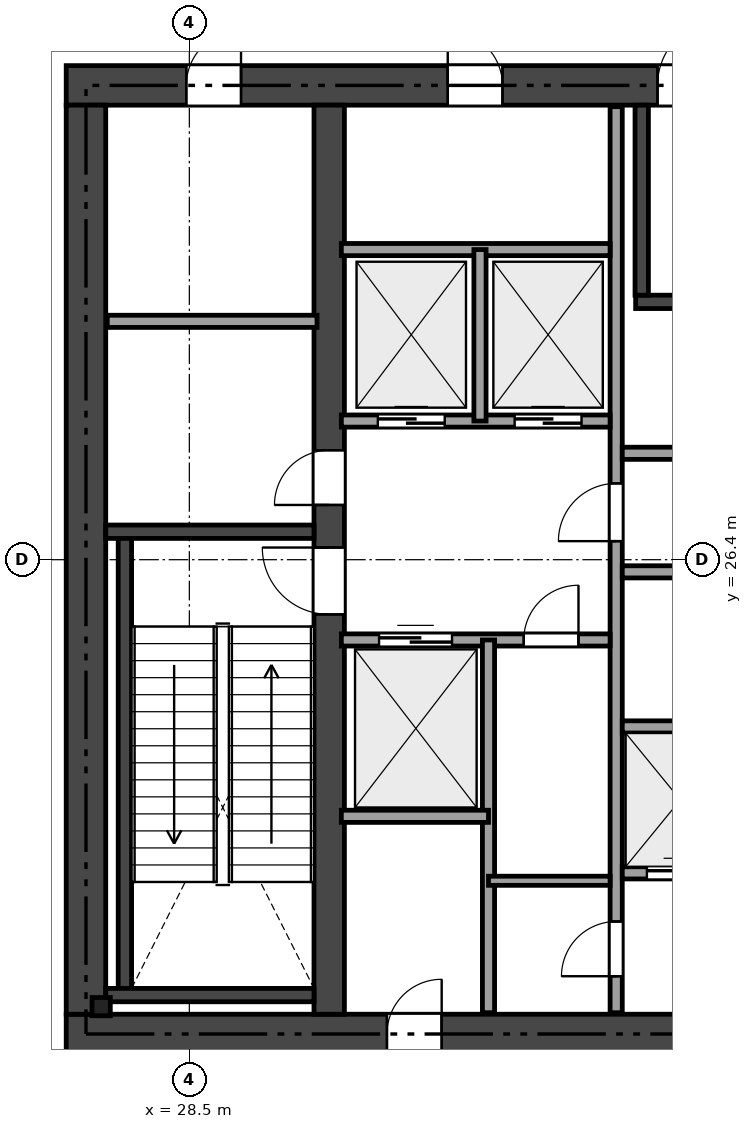
"""IFC4 building model, lengths in metres.
Left out: names, types, materials, properties, quantities, classifications, styles, units other than length and angle.
Written with IfcOpenShell. Run it as: python <this file> out.ifc"""

import sys

from ifc_helpers import new_model, si_unit, direction, frame, frame_2d, origin, origin_2d, place, context, subcontext, project, spatial, rectangle, i_section, extrude, element, fill, save


model = new_model("IFC4")
c1 = context("Model", 3, precision=1e-05, world=origin(), true_north=direction((0.0, 1.0)))
c2 = subcontext(c1, "Body", "Model", "MODEL_VIEW")
j1 = project(units=[si_unit("LENGTHUNIT", "METRE"), si_unit("PLANEANGLEUNIT", "RADIAN")], contexts=[c1])
p1 = place(None, origin())
s1 = spatial("IfcSite", under=j1, at=p1, CompositionType="ELEMENT")
p2 = place(p1, origin())
s2 = spatial("IfcBuilding", under=s1, at=p2, CompositionType="ELEMENT")
p3 = place(p2, frame((0.0, 0.0, 10.8)))
s3 = spatial("IfcBuildingStorey", under=s2, at=p3, CompositionType="ELEMENT", Elevation=10.8)
p4 = place(p3, frame((26.475, 18.6, 0.0), z_axis=(0.0, 0.0, 1.0), x_axis=(1.0, 0.0, 0.0)))
e1 = element("IfcWall", 1, at=p4, inside=s3, PredefinedType="SHEAR", context=c2, shape_type="SweptSolid", body=[
    extrude(rectangle(XDim=21.45, YDim=0.65, at=frame_2d((10.725, 0.0))), origin(), (0.0, 0.0, 1.0), 5.05),
])
p5 = place(p4, frame((12.45, 0.0, 0.0)))
e2 = element("IfcOpeningElement", 2, at=p5, cuts=e1, PredefinedType="OPENING", context=c2, shape_type="SweptSolid", body=[
    extrude(rectangle(XDim=1.15, YDim=2.15, at=frame_2d((0.575, 1.075))), frame((0.0, 0.335, 0.0), z_axis=(0.0, -1.0, 0.0), x_axis=(1.0, 0.0, 0.0)), (0.0, 0.0, 1.0), 0.67),
])
p6 = place(p4, frame((5.275, 0.0, 0.0)))
e3 = element("IfcOpeningElement", 3, at=p6, cuts=e1, PredefinedType="OPENING", context=c2, shape_type="SweptSolid", body=[
    extrude(rectangle(XDim=0.9, YDim=2.1, at=frame_2d((0.45, 1.05))), frame((0.0, 0.335, 0.0), z_axis=(0.0, -1.0, 0.0), x_axis=(1.0, 0.0, 0.0)), (0.0, 0.0, 1.0), 0.67),
])
p7 = place(p3, frame((26.475, 34.2, 0.0), z_axis=(0.0, 0.0, 1.0), x_axis=(1.0, 0.0, 0.0)))
e4 = element("IfcWall", 4, at=p7, inside=s3, PredefinedType="SHEAR", context=c2, shape_type="SweptSolid", body=[
    extrude(rectangle(XDim=21.45, YDim=0.65, at=frame_2d((10.725, 0.0))), origin(), (0.0, 0.0, 1.0), 5.05),
])
p8 = place(p7, frame((9.725, 0.0, 0.0)))
e5 = element("IfcOpeningElement", 5, at=p8, cuts=e4, PredefinedType="OPENING", context=c2, shape_type="SweptSolid", body=[
    extrude(rectangle(XDim=1.1, YDim=2.15, at=frame_2d((0.55, 1.075))), frame((0.0, 0.335, 0.0), z_axis=(0.0, -1.0, 0.0), x_axis=(1.0, 0.0, 0.0)), (0.0, 0.0, 1.0), 0.67),
])
p9 = place(p7, frame((1.975, 0.0, 0.0)))
e6 = element("IfcOpeningElement", 6, at=p9, cuts=e4, PredefinedType="OPENING", context=c2, shape_type="SweptSolid", body=[
    extrude(rectangle(XDim=0.9, YDim=2.1, at=frame_2d((0.45, 1.05))), frame((0.0, 0.335, 0.0), z_axis=(0.0, -1.0, 0.0), x_axis=(1.0, 0.0, 0.0)), (0.0, 0.0, 1.0), 0.67),
])
p10 = place(p7, frame((6.275, 0.0, 0.0)))
e7 = element("IfcOpeningElement", 7, at=p10, cuts=e4, PredefinedType="OPENING", context=c2, shape_type="SweptSolid", body=[
    extrude(rectangle(XDim=0.9, YDim=2.1, at=frame_2d((0.45, 1.05))), frame((0.0, 0.335, 0.0), z_axis=(0.0, -1.0, 0.0), x_axis=(1.0, 0.0, 0.0)), (0.0, 0.0, 1.0), 0.67),
])
p11 = place(p3, frame((26.8, 18.925, 0.0), z_axis=(0.0, 0.0, 1.0), x_axis=(0.0, 1.0, 0.0)))
e8 = element("IfcWall", 8, at=p11, inside=s3, PredefinedType="SHEAR", context=c2, shape_type="SweptSolid", body=[
    extrude(rectangle(XDim=14.95, YDim=0.65, at=frame_2d((7.475, 0.0))), origin(), (0.0, 0.0, 1.0), 5.05),
])
p12 = place(p3, frame((30.8, 18.925, 0.0), z_axis=(0.0, 0.0, 1.0), x_axis=(0.0, 1.0, 0.0)))
e9 = element("IfcWall", 9, at=p12, inside=s3, PredefinedType="SHEAR", context=c2, shape_type="SweptSolid", body=[
    extrude(rectangle(XDim=14.95, YDim=0.5, at=frame_2d((7.475, 0.0))), origin(), (0.0, 0.0, 1.0), 5.05),
])
p13 = place(p12, frame((6.575, 0.0, 0.0)))
e10 = element("IfcOpeningElement", 10, at=p13, cuts=e9, PredefinedType="OPENING", context=c2, shape_type="SweptSolid", body=[
    extrude(rectangle(XDim=1.1, YDim=2.15, at=frame_2d((0.55, 1.075))), frame((0.0, 0.26, 0.0), z_axis=(0.0, -1.0, 0.0), x_axis=(1.0, 0.0, 0.0)), (0.0, 0.0, 1.0), 0.52),
])
p14 = place(p12, frame((8.375, 0.0, 0.0)))
e11 = element("IfcOpeningElement", 11, at=p14, cuts=e9, PredefinedType="OPENING", context=c2, shape_type="SweptSolid", body=[
    extrude(rectangle(XDim=0.9, YDim=2.1, at=frame_2d((0.45, 1.05))), frame((0.0, 0.26, 0.0), z_axis=(0.0, -1.0, 0.0), x_axis=(1.0, 0.0, 0.0)), (0.0, 0.0, 1.0), 0.52),
])
p15 = place(p3, frame((27.125, 26.86, 0.0), z_axis=(0.0, 0.0, 1.0), x_axis=(1.0, 0.0, 0.0)))
e12 = element("IfcWall", 12, at=p15, inside=s3, PredefinedType="SHEAR", context=c2, shape_type="SweptSolid", body=[
    extrude(rectangle(XDim=3.425, YDim=0.22, at=frame_2d((1.712, 0.0))), origin(), (0.0, 0.0, 1.0), 5.05),
])
p16 = place(p3, frame((27.44, 19.35, 0.0), z_axis=(0.0, 0.0, 1.0), x_axis=(0.0, 1.0, 0.0)))
e13 = element("IfcWall", 13, at=p16, inside=s3, PredefinedType="SHEAR", context=c2, shape_type="SweptSolid", body=[
    extrude(rectangle(XDim=7.4, YDim=0.22, at=frame_2d((3.7, 0.0))), origin(), (0.0, 0.0, 1.0), 5.05),
])
p17 = place(p3, frame((27.125, 19.24, 0.0), z_axis=(0.0, 0.0, 1.0), x_axis=(1.0, 0.0, 0.0)))
e14 = element("IfcWall", 14, at=p17, inside=s3, PredefinedType="SHEAR", context=c2, shape_type="SweptSolid", body=[
    extrude(rectangle(XDim=3.425, YDim=0.22, at=frame_2d((1.712, 0.0))), origin(), (0.0, 0.0, 1.0), 5.05),
])
p18 = place(p3, frame((35.84, 30.64, 0.0), z_axis=(0.0, 0.0, 1.0), x_axis=(1.0, 0.0, 0.0)))
e15 = element("IfcWall", 15, at=p18, inside=s3, PredefinedType="SHEAR", context=c2, shape_type="SweptSolid", body=[
    extrude(rectangle(XDim=7.61, YDim=0.22, at=frame_2d((3.805, 0.0))), origin(), (0.0, 0.0, 1.0), 5.05),
])
p19 = place(p3, frame((35.94, 30.75, 0.0), z_axis=(0.0, 0.0, 1.0), x_axis=(0.0, 1.0, 0.0)))
e16 = element("IfcWall", 16, at=p19, inside=s3, PredefinedType="SHEAR", context=c2, shape_type="SweptSolid", body=[
    extrude(rectangle(XDim=3.125, YDim=0.22, at=frame_2d((1.562, 0.0))), origin(), (0.0, 0.0, 1.0), 5.05),
])
p20 = place(p3, frame((27.05, 19.05, 0.0), z_axis=(0.0, 0.0, 1.0), x_axis=(1.0, 0.0, 0.0)))
e17 = element("IfcColumn", 17, at=p20, inside=s3, PredefinedType="PILASTER", context=c2, shape_type="SweptSolid", body=[
    extrude(i_section(OverallWidth=0.3, OverallDepth=0.3, WebThickness=0.011, FlangeThickness=0.019, at=origin_2d()), origin(), (0.0, 0.0, 1.0), 5.05),
])
p21 = place(p3, frame((27.15, 30.32, 0.0), z_axis=(0.0, 0.0, 1.0), x_axis=(1.0, 0.0, 0.0)))
e18 = element("IfcWall", 18, at=p21, inside=s3, PredefinedType="SOLIDWALL", context=c2, shape_type="SweptSolid", body=[
    extrude(rectangle(XDim=3.45, YDim=0.2, at=frame_2d((1.725, 0.0))), origin(), (0.0, 0.0, 1.0), 5.05),
])
p22 = place(p3, frame((35.52, 18.95, 0.0), z_axis=(0.0, 0.0, 1.0), x_axis=(0.0, 1.0, 0.0)))
e19 = element("IfcWall", 19, at=p22, inside=s3, PredefinedType="SOLIDWALL", context=c2, shape_type="SweptSolid", body=[
    extrude(rectangle(XDim=14.9, YDim=0.2, at=frame_2d((7.45, 0.0))), origin(), (0.0, 0.0, 1.0), 4.571),
])
p23 = place(p22, frame((7.755, 0.0, 0.0)))
e20 = element("IfcOpeningElement", 20, at=p23, cuts=e19, PredefinedType="OPENING", context=c2, shape_type="SweptSolid", body=[
    extrude(rectangle(XDim=0.95, YDim=2.15, at=frame_2d((0.475, 1.075))), frame((0.0, 0.11, 0.0), z_axis=(0.0, -1.0, 0.0), x_axis=(1.0, 0.0, 0.0)), (0.0, 0.0, 1.0), 0.22),
])
p24 = place(p22, frame((0.6, 0.0, 0.0)))
e21 = element("IfcOpeningElement", 21, at=p24, cuts=e19, PredefinedType="OPENING", context=c2, shape_type="SweptSolid", body=[
    extrude(rectangle(XDim=0.9, YDim=2.1, at=frame_2d((0.45, 1.05))), frame((0.0, 0.11, 0.0), z_axis=(0.0, -1.0, 0.0), x_axis=(1.0, 0.0, 0.0)), (0.0, 0.0, 1.0), 0.22),
])
p25 = place(p3, frame((31.0, 28.68, 0.0), z_axis=(0.0, 0.0, 1.0), x_axis=(1.0, 0.0, 0.0)))
e22 = element("IfcWall", 22, at=p25, inside=s3, PredefinedType="SOLIDWALL", context=c2, shape_type="SweptSolid", body=[
    extrude(rectangle(XDim=4.42, YDim=0.2, at=frame_2d((2.21, 0.0))), origin(), (0.0, 0.0, 1.0), 5.05),
])
p26 = place(p25, frame((0.6, 0.0, 0.0)))
e23 = element("IfcOpeningElement", 23, at=p26, cuts=e22, PredefinedType="OPENING", context=c2, shape_type="SweptSolid", body=[
    extrude(rectangle(XDim=1.1, YDim=2.15, at=frame_2d((0.55, 1.075))), frame((0.0, 0.11, 0.0), z_axis=(0.0, -1.0, 0.0), x_axis=(1.0, 0.0, 0.0)), (0.0, 0.0, 1.0), 0.22),
])
p27 = place(p25, frame((2.85, 0.0, 0.0)))
e24 = element("IfcOpeningElement", 24, at=p27, cuts=e22, PredefinedType="OPENING", context=c2, shape_type="SweptSolid", body=[
    extrude(rectangle(XDim=1.1, YDim=2.15, at=frame_2d((0.55, 1.075))), frame((0.0, 0.11, 0.0), z_axis=(0.0, -1.0, 0.0), x_axis=(1.0, 0.0, 0.0)), (0.0, 0.0, 1.0), 0.22),
])
p28 = place(p3, frame((31.0, 31.5, 0.0), z_axis=(0.0, 0.0, 1.0), x_axis=(1.0, 0.0, 0.0)))
e25 = element("IfcWall", 25, at=p28, inside=s3, PredefinedType="SOLIDWALL", context=c2, shape_type="SweptSolid", body=[
    extrude(rectangle(XDim=4.42, YDim=0.2, at=frame_2d((2.21, 0.0))), origin(), (0.0, 0.0, 1.0), 5.05),
])
p29 = place(p3, frame((33.28, 28.68, 0.0), z_axis=(0.0, 0.0, 1.0), x_axis=(0.0, 1.0, 0.0)))
e26 = element("IfcWall", 26, at=p29, inside=s3, PredefinedType="SOLIDWALL", context=c2, shape_type="SweptSolid", body=[
    extrude(rectangle(XDim=2.82, YDim=0.2, at=frame_2d((1.41, 0.0))), origin(), (0.0, 0.0, 1.0), 5.05),
])
p30 = place(p3, frame((31.0, 25.08, 0.0), z_axis=(0.0, 0.0, 1.0), x_axis=(1.0, 0.0, 0.0)))
e27 = element("IfcWall", 27, at=p30, inside=s3, PredefinedType="SOLIDWALL", context=c2, shape_type="SweptSolid", body=[
    extrude(rectangle(XDim=4.42, YDim=0.2, at=frame_2d((2.21, 0.0))), origin(), (0.0, 0.0, 1.0), 5.05),
])
p31 = place(p30, frame((3.0, 0.0, 0.0)))
e28 = element("IfcOpeningElement", 28, at=p31, cuts=e27, PredefinedType="OPENING", context=c2, shape_type="SweptSolid", body=[
    extrude(rectangle(XDim=0.9, YDim=2.1, at=frame_2d((0.45, 1.05))), frame((0.0, 0.11, 0.0), z_axis=(0.0, -1.0, 0.0), x_axis=(1.0, 0.0, 0.0)), (0.0, 0.0, 1.0), 0.22),
])
p32 = place(p30, frame((0.62, 0.0, 0.0)))
e29 = element("IfcOpeningElement", 29, at=p32, cuts=e27, PredefinedType="OPENING", context=c2, shape_type="SweptSolid", body=[
    extrude(rectangle(XDim=1.2, YDim=2.15, at=frame_2d((0.6, 1.075))), frame((0.0, 0.11, 0.0), z_axis=(0.0, -1.0, 0.0), x_axis=(1.0, 0.0, 0.0)), (0.0, 0.0, 1.0), 0.22),
])
p33 = place(p3, frame((33.42, 18.95, 0.0), z_axis=(0.0, 0.0, 1.0), x_axis=(0.0, 1.0, 0.0)))
e30 = element("IfcWall", 30, at=p33, inside=s3, PredefinedType="SOLIDWALL", context=c2, shape_type="SweptSolid", body=[
    extrude(rectangle(XDim=6.13, YDim=0.2, at=frame_2d((3.065, 0.0))), origin(), (0.0, 0.0, 1.0), 4.571),
])
p34 = place(p3, frame((31.0, 22.18, 0.0), z_axis=(0.0, 0.0, 1.0), x_axis=(1.0, 0.0, 0.0)))
e31 = element("IfcWall", 31, at=p34, inside=s3, PredefinedType="SOLIDWALL", context=c2, shape_type="SweptSolid", body=[
    extrude(rectangle(XDim=2.42, YDim=0.2, at=frame_2d((1.21, 0.0))), origin(), (0.0, 0.0, 1.0), 5.05),
])
p35 = place(p3, frame((33.42, 21.12, 0.0), z_axis=(0.0, 0.0, 1.0), x_axis=(1.0, 0.0, 0.0)))
e32 = element("IfcWall", 32, at=p35, inside=s3, PredefinedType="PARTITIONING", context=c2, shape_type="SweptSolid", body=[
    extrude(rectangle(XDim=2.0, YDim=0.15, at=frame_2d((1.0, 0.0))), origin(), (0.0, 0.0, 1.0), 5.05),
])
for number, where, z_axis, x_axis in (
    (33, (35.62, 28.15, 0.0), (0.0, 0.0, 1.0), (1.0, 0.0, 0.0)),
    (34, (35.62, 26.2, 0.0), (0.0, 0.0, 1.0), (1.0, 0.0, 0.0)),
):
    element("IfcWall", number, at=place(p3, frame(where, z_axis=z_axis, x_axis=x_axis)), inside=s3, PredefinedType="SOLIDWALL", context=c2, shape_type="SweptSolid", body=[
        extrude(rectangle(XDim=7.88, YDim=0.2, at=frame_2d((3.94, 0.0))), origin(), (0.0, 0.0, 1.0), 5.05),
    ])
p36 = place(p3, frame((35.62, 23.65, 0.0), z_axis=(0.0, 0.0, 1.0), x_axis=(1.0, 0.0, 0.0)))
e35 = element("IfcWall", 35, at=p36, inside=s3, PredefinedType="SOLIDWALL", context=c2, shape_type="SweptSolid", body=[
    extrude(rectangle(XDim=7.88, YDim=0.2, at=frame_2d((3.94, 0.0))), origin(), (0.0, 0.0, 1.0), 4.571),
])
p37 = place(p3, frame((35.62, 21.25, 0.0), z_axis=(0.0, 0.0, 1.0), x_axis=(1.0, 0.0, 0.0)))
e36 = element("IfcWall", 36, at=p37, inside=s3, PredefinedType="SOLIDWALL", context=c2, shape_type="SweptSolid", body=[
    extrude(rectangle(XDim=7.88, YDim=0.2, at=frame_2d((3.94, 0.0))), origin(), (0.0, 0.0, 1.0), 5.05),
])
p38 = place(p37, frame((0.405, 0.0, 0.0)))
e37 = element("IfcOpeningElement", 37, at=p38, cuts=e36, PredefinedType="OPENING", context=c2, shape_type="SweptSolid", body=[
    extrude(rectangle(XDim=1.1, YDim=2.15, at=frame_2d((0.55, 1.075))), frame((0.0, 0.11, 0.0), z_axis=(0.0, -1.0, 0.0), x_axis=(1.0, 0.0, 0.0)), (0.0, 0.0, 1.0), 0.22),
])
p39 = place(p37, frame((2.355, 0.0, 0.0)))
e38 = element("IfcOpeningElement", 38, at=p39, cuts=e36, PredefinedType="OPENING", context=c2, shape_type="SweptSolid", body=[
    extrude(rectangle(XDim=1.1, YDim=2.15, at=frame_2d((0.55, 1.075))), frame((0.0, 0.11, 0.0), z_axis=(0.0, -1.0, 0.0), x_axis=(1.0, 0.0, 0.0)), (0.0, 0.0, 1.0), 0.22),
])
p40 = place(p37, frame((4.305, 0.0, 0.0)))
e39 = element("IfcOpeningElement", 39, at=p40, cuts=e36, PredefinedType="OPENING", context=c2, shape_type="SweptSolid", body=[
    extrude(rectangle(XDim=1.1, YDim=2.15, at=frame_2d((0.55, 1.075))), frame((0.0, 0.11, 0.0), z_axis=(0.0, -1.0, 0.0), x_axis=(1.0, 0.0, 0.0)), (0.0, 0.0, 1.0), 0.22),
])
p41 = place(p37, frame((6.255, 0.0, 0.0)))
e40 = element("IfcOpeningElement", 40, at=p41, cuts=e36, PredefinedType="OPENING", context=c2, shape_type="SweptSolid", body=[
    extrude(rectangle(XDim=1.1, YDim=2.15, at=frame_2d((0.55, 1.075))), frame((0.0, 0.11, 0.0), z_axis=(0.0, -1.0, 0.0), x_axis=(1.0, 0.0, 0.0)), (0.0, 0.0, 1.0), 0.22),
])
p42 = place(p13, origin())
e41 = element("IfcDoor", 41, at=p42, inside=s3, OperationType="SINGLE_SWING_RIGHT", PredefinedType="DOOR", context=c2, shape_type="SweptSolid", body=[
    extrude(rectangle(XDim=1.1, YDim=2.15, at=frame_2d((0.55, 1.075))), frame((0.0, 0.025, 0.0), z_axis=(0.0, -1.0, 0.0), x_axis=(1.0, 0.0, 0.0)), (0.0, 0.0, 1.0), 0.05),
])
fill(e10, e41)
p43 = place(p8, origin())
e42 = element("IfcDoor", 42, at=p43, inside=s3, OperationType="SINGLE_SWING_RIGHT", PredefinedType="DOOR", context=c2, shape_type="SweptSolid", body=[
    extrude(rectangle(XDim=1.1, YDim=2.15, at=frame_2d((0.55, 1.075))), frame((0.0, 0.025, 0.0), z_axis=(0.0, -1.0, 0.0), x_axis=(1.0, 0.0, 0.0)), (0.0, 0.0, 1.0), 0.05),
])
fill(e5, e42)
p44 = place(p23, origin())
e43 = element("IfcDoor", 43, at=p44, inside=s3, OperationType="SINGLE_SWING_LEFT", PredefinedType="DOOR", context=c2, shape_type="SweptSolid", body=[
    extrude(rectangle(XDim=0.95, YDim=2.15, at=frame_2d((0.475, 1.075))), frame((0.0, 0.025, 0.0), z_axis=(0.0, -1.0, 0.0), x_axis=(1.0, 0.0, 0.0)), (0.0, 0.0, 1.0), 0.05),
])
fill(e20, e43)
p45 = place(p14, origin())
e44 = element("IfcDoor", 44, at=p45, inside=s3, OperationType="SINGLE_SWING_LEFT", PredefinedType="DOOR", context=c2, shape_type="SweptSolid", body=[
    extrude(rectangle(XDim=0.9, YDim=2.1, at=frame_2d((0.45, 1.05))), frame((0.0, 0.025, 0.0), z_axis=(0.0, -1.0, 0.0), x_axis=(1.0, 0.0, 0.0)), (0.0, 0.0, 1.0), 0.05),
])
fill(e11, e44)
p46 = place(p9, origin())
e45 = element("IfcDoor", 45, at=p46, inside=s3, OperationType="SINGLE_SWING_RIGHT", PredefinedType="DOOR", context=c2, shape_type="SweptSolid", body=[
    extrude(rectangle(XDim=0.9, YDim=2.1, at=frame_2d((0.45, 1.05))), frame((0.0, 0.025, 0.0), z_axis=(0.0, -1.0, 0.0), x_axis=(1.0, 0.0, 0.0)), (0.0, 0.0, 1.0), 0.05),
])
fill(e6, e45)
p47 = place(p10, origin())
e46 = element("IfcDoor", 46, at=p47, inside=s3, OperationType="SINGLE_SWING_LEFT", PredefinedType="DOOR", context=c2, shape_type="SweptSolid", body=[
    extrude(rectangle(XDim=0.9, YDim=2.1, at=frame_2d((0.45, 1.05))), frame((0.0, 0.025, 0.0), z_axis=(0.0, -1.0, 0.0), x_axis=(1.0, 0.0, 0.0)), (0.0, 0.0, 1.0), 0.05),
])
fill(e7, e46)
p48 = place(p6, origin())
e47 = element("IfcDoor", 47, at=p48, inside=s3, OperationType="SINGLE_SWING_RIGHT", PredefinedType="DOOR", context=c2, shape_type="SweptSolid", body=[
    extrude(rectangle(XDim=0.9, YDim=2.1, at=frame_2d((0.45, 1.05))), frame((0.0, 0.025, 0.0), z_axis=(0.0, -1.0, 0.0), x_axis=(1.0, 0.0, 0.0)), (0.0, 0.0, 1.0), 0.05),
])
fill(e3, e47)
p49 = place(p24, origin())
e48 = element("IfcDoor", 48, at=p49, inside=s3, OperationType="SINGLE_SWING_LEFT", PredefinedType="DOOR", context=c2, shape_type="SweptSolid", body=[
    extrude(rectangle(XDim=0.9, YDim=2.1, at=frame_2d((0.45, 1.05))), frame((0.0, 0.025, 0.0), z_axis=(0.0, -1.0, 0.0), x_axis=(1.0, 0.0, 0.0)), (0.0, 0.0, 1.0), 0.05),
])
fill(e21, e48)
p50 = place(p31, origin())
e49 = element("IfcDoor", 49, at=p50, inside=s3, OperationType="SINGLE_SWING_RIGHT", PredefinedType="DOOR", context=c2, shape_type="SweptSolid", body=[
    extrude(rectangle(XDim=0.9, YDim=2.1, at=frame_2d((0.45, 1.05))), frame((0.0, 0.025, 0.0), z_axis=(0.0, -1.0, 0.0), x_axis=(1.0, 0.0, 0.0)), (0.0, 0.0, 1.0), 0.05),
])
fill(e28, e49)
p51 = place(p26, origin())
e50 = element("IfcDoor", 50, at=p51, inside=s3, OperationType="SLIDING_TO_LEFT", PredefinedType="DOOR", context=c2, shape_type="SweptSolid", body=[
    extrude(rectangle(XDim=1.1, YDim=2.15, at=frame_2d((0.55, 1.075))), frame((0.0, 0.025, 0.0), z_axis=(0.0, -1.0, 0.0), x_axis=(1.0, 0.0, 0.0)), (0.0, 0.0, 1.0), 0.05),
])
fill(e23, e50)
p52 = place(p27, origin())
e51 = element("IfcDoor", 51, at=p52, inside=s3, OperationType="SLIDING_TO_LEFT", PredefinedType="DOOR", context=c2, shape_type="SweptSolid", body=[
    extrude(rectangle(XDim=1.1, YDim=2.15, at=frame_2d((0.55, 1.075))), frame((0.0, 0.025, 0.0), z_axis=(0.0, -1.0, 0.0), x_axis=(1.0, 0.0, 0.0)), (0.0, 0.0, 1.0), 0.05),
])
fill(e24, e51)
p53 = place(p32, origin())
e52 = element("IfcDoor", 52, at=p53, inside=s3, OperationType="SLIDING_TO_LEFT", PredefinedType="DOOR", context=c2, shape_type="SweptSolid", body=[
    extrude(rectangle(XDim=1.2, YDim=2.15, at=frame_2d((0.6, 1.075))), frame((0.0, 0.025, 0.0), z_axis=(0.0, -1.0, 0.0), x_axis=(1.0, 0.0, 0.0)), (0.0, 0.0, 1.0), 0.05),
])
fill(e29, e52)
p54 = place(p38, origin())
e53 = element("IfcDoor", 53, at=p54, inside=s3, OperationType="SLIDING_TO_LEFT", PredefinedType="DOOR", context=c2, shape_type="SweptSolid", body=[
    extrude(rectangle(XDim=1.1, YDim=2.15, at=frame_2d((0.55, 1.075))), frame((0.0, 0.025, 0.0), z_axis=(0.0, -1.0, 0.0), x_axis=(1.0, 0.0, 0.0)), (0.0, 0.0, 1.0), 0.05),
])
fill(e37, e53)
save(model, sys.argv[1])
